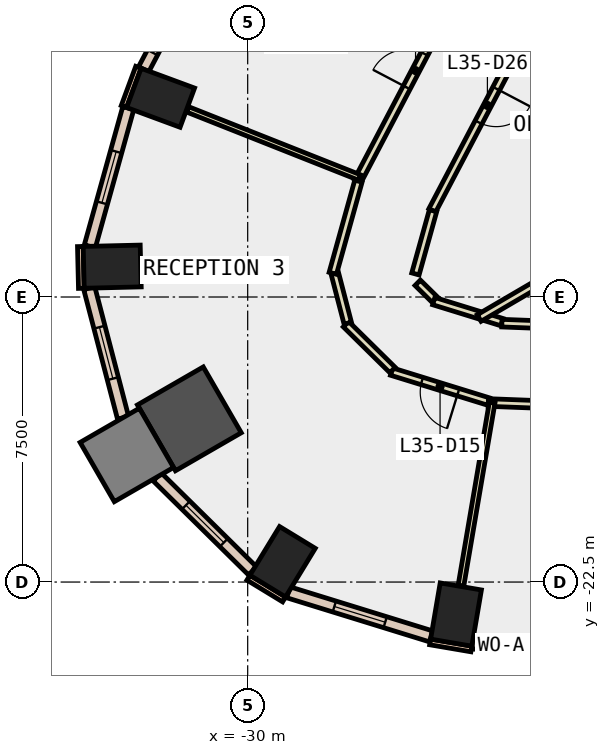
"""IFC4 building model, lengths in metres.
Left out: names, types, materials, properties, quantities, classifications, styles, units other than length and angle.
Written with IfcOpenShell. Run it as: python <this file> out.ifc"""

import sys

from ifc_helpers import new_model, si_unit, direction, frame, frame_2d, origin, origin_2d, place, context, subcontext, project, spatial, rectangle, extrude, element, fill, save


model = new_model("IFC4")
c1 = context("Model", 3, precision=1e-05, world=origin(), true_north=direction((0.0, 1.0)))
c2 = subcontext(c1, "Body", "Model", "MODEL_VIEW")
j1 = project(units=[si_unit("LENGTHUNIT", "METRE"), si_unit("PLANEANGLEUNIT", "RADIAN")], contexts=[c1])
p1 = place(None, origin())
s1 = spatial("IfcSite", under=j1, at=p1, CompositionType="ELEMENT")
p2 = place(p1, origin())
s2 = spatial("IfcBuilding", under=s1, at=p2, CompositionType="ELEMENT")
p3 = place(p2, frame((0.0, 0.0, 159.2)))
s3 = spatial("IfcBuildingStorey", under=s2, at=p3, CompositionType="ELEMENT", Elevation=159.2)
for number, where, z_axis, x_axis in (
    (1, (-24.518, -23.355, -0.4), (0.0, 0.0, 1.0), (-0.986, 0.168, 0.0)),
    (2, (-32.292, -9.758, -0.4), (0.0, 0.0, 1.0), (0.347, 0.938, 0.0)),
    (3, (-33.565, -14.202, -0.4), (0.0, 0.0, 1.0), (-0.024, 1.0, 0.0)),
):
    element("IfcColumn", number, at=place(p3, frame(where, z_axis=z_axis, x_axis=x_axis)), inside=s3, PredefinedType="COLUMN", context=c2, shape_type="SweptSolid", body=[
        extrude(rectangle(XDim=1.1, YDim=1.5, at=origin_2d()), origin(), (0.0, 0.0, 1.0), 4.2),
    ])
p4 = place(p3, frame((-31.535, -18.206, -0.4), z_axis=(0.0, 0.0, 1.0), x_axis=(0.866025403784, 0.5, 0.0)))
e4 = element("IfcColumn", 4, at=p4, inside=s3, PredefinedType="COLUMN", context=c2, shape_type="SweptSolid", body=[
    extrude(rectangle(XDim=2.0, YDim=2.0, at=origin_2d()), origin(), (0.0, 0.0, 1.0), 4.2),
])
p5 = place(p3, frame((-29.082, -21.967, -0.4), z_axis=(0.0, 0.0, 1.0), x_axis=(-0.853714435155, 0.520741455243, 0.0)))
e5 = element("IfcColumn", 5, at=p5, inside=s3, PredefinedType="COLUMN", context=c2, shape_type="SweptSolid", body=[
    extrude(rectangle(XDim=1.1, YDim=1.5, at=origin_2d()), origin(), (0.0, 0.0, 1.0), 4.2),
])
p6 = place(p3, frame((-33.18, -19.156, -0.4), z_axis=(0.0, 0.0, 1.0), x_axis=(0.866025403784, 0.5, 0.0)))
e6 = element("IfcColumn", 6, at=p6, inside=s3, PredefinedType="COLUMN", context=c2, shape_type="SweptSolid", body=[
    extrude(rectangle(XDim=1.8, YDim=1.8, at=origin_2d()), origin(), (0.0, 0.0, 1.0), 4.2),
])
p7 = place(p3, frame((-32.875, -8.956, 0.0), z_axis=(0.0, 0.0, 1.0), x_axis=(-0.346425160624, -0.93807761304, 0.0)))
e7 = element("IfcWall", 7, at=p7, inside=s3, PredefinedType="STANDARD", context=c2, shape_type="SweptSolid", body=[
    extrude(rectangle(XDim=1.1, YDim=0.15, at=frame_2d((0.55, 0.0))), origin(), (0.0, 0.0, 1.0), 3.8),
])
p8 = place(p3, frame((-25.199, -24.076, 0.0), z_axis=(0.0, 0.0, 1.0), x_axis=(0.985763338892, -0.168138751323, 0.0)))
e8 = element("IfcWall", 8, at=p8, inside=s3, PredefinedType="STANDARD", context=c2, shape_type="SweptSolid", body=[
    extrude(rectangle(XDim=1.101, YDim=0.15, at=frame_2d((0.55, 0.0))), origin(), (0.0, 0.0, 1.0), 3.8),
])
p9 = place(p3, frame((-34.403, -13.672, 0.0), z_axis=(0.0, 0.0, 1.0), x_axis=(0.023744690764, -0.999718055084, 0.0)))
e9 = element("IfcWall", 9, at=p9, inside=s3, PredefinedType="STANDARD", context=c2, shape_type="SweptSolid", body=[
    extrude(rectangle(XDim=1.1, YDim=0.15, at=frame_2d((0.55, 0.0))), origin(), (0.0, 0.0, 1.0), 3.8),
])
p10 = place(p3, frame((-29.981, -22.385, 0.0), z_axis=(0.0, 0.0, 1.0), x_axis=(0.854005542721, -0.520263907071, 0.0)))
e10 = element("IfcWall", 10, at=p10, inside=s3, PredefinedType="STANDARD", context=c2, shape_type="SweptSolid", body=[
    extrude(rectangle(XDim=1.099, YDim=0.15, at=frame_2d((0.55, 0.0))), origin(), (0.0, 0.0, 1.0), 3.8),
])
p11 = place(p3, frame((-24.09, -24.114, 0.0), z_axis=(0.0, 0.0, 1.0), x_axis=(0.999262356942, -0.038402369711, 0.0)))
e11 = element("IfcWall", 11, at=p11, inside=s3, PredefinedType="STANDARD", context=c2, shape_type="SweptSolid", body=[
    extrude(rectangle(XDim=7.317, YDim=0.3, at=frame_2d((3.659, 0.0))), origin(), (0.0, 0.0, 1.0), 3.8),
])
p12 = place(p11, frame((0.629, 0.0, 0.9)))
e12 = element("IfcOpeningElement", 12, at=p12, cuts=e11, PredefinedType="OPENING", context=c2, shape_type="SweptSolid", body=[
    extrude(rectangle(XDim=2.4, YDim=2.6, at=frame_2d((1.2, 1.3))), frame((0.0, 0.16, 0.0), z_axis=(0.0, -1.0, 0.0), x_axis=(1.0, 0.0, 0.0)), (0.0, 0.0, 1.0), 0.32),
])
p13 = place(p11, frame((4.288, 0.0, 0.9)))
e13 = element("IfcOpeningElement", 13, at=p13, cuts=e11, PredefinedType="OPENING", context=c2, shape_type="SweptSolid", body=[
    extrude(rectangle(XDim=2.4, YDim=2.6, at=frame_2d((1.2, 1.3))), frame((0.0, 0.16, 0.0), z_axis=(0.0, -1.0, 0.0), x_axis=(1.0, 0.0, 0.0)), (0.0, 0.0, 1.0), 0.32),
])
p14 = place(p3, frame((-29.951, -3.705, 0.0), z_axis=(0.0, 0.0, 1.0), x_axis=(-0.465104650407, -0.885255705528, 0.0)))
e14 = element("IfcWall", 14, at=p14, inside=s3, PredefinedType="STANDARD", context=c2, shape_type="SweptSolid", body=[
    extrude(rectangle(XDim=5.99, YDim=0.3, at=frame_2d((2.995, 0.0))), origin(), (0.0, 0.0, 1.0), 3.8),
])
p15 = place(p14, frame((0.498, 0.0, 0.9)))
e15 = element("IfcOpeningElement", 15, at=p15, cuts=e14, PredefinedType="OPENING", context=c2, shape_type="SweptSolid", body=[
    extrude(rectangle(XDim=2.0, YDim=2.6, at=frame_2d((1.0, 1.3))), frame((0.0, 0.16, 0.0), z_axis=(0.0, -1.0, 0.0), x_axis=(1.0, 0.0, 0.0)), (0.0, 0.0, 1.0), 0.32),
])
p16 = place(p14, frame((3.493, 0.0, 0.9)))
e16 = element("IfcOpeningElement", 16, at=p16, cuts=e14, PredefinedType="OPENING", context=c2, shape_type="SweptSolid", body=[
    extrude(rectangle(XDim=2.0, YDim=2.6, at=frame_2d((1.0, 1.3))), frame((0.0, 0.16, 0.0), z_axis=(0.0, -1.0, 0.0), x_axis=(1.0, 0.0, 0.0)), (0.0, 0.0, 1.0), 0.32),
])
p17 = place(p3, frame((-33.142, -10.029, 0.0), z_axis=(0.0, 0.0, 1.0), x_axis=(-0.26799398221, -0.963420585985, 0.0)))
e17 = element("IfcWall", 17, at=p17, inside=s3, PredefinedType="STANDARD", context=c2, shape_type="SweptSolid", body=[
    extrude(rectangle(XDim=3.776, YDim=0.3, at=frame_2d((1.888, 0.0))), origin(), (0.0, 0.0, 1.0), 3.8),
])
p18 = place(p17, frame((1.188, 0.0, 0.9)))
e18 = element("IfcOpeningElement", 18, at=p18, cuts=e17, PredefinedType="OPENING", context=c2, shape_type="SweptSolid", body=[
    extrude(rectangle(XDim=1.4, YDim=2.6, at=frame_2d((0.7, 1.3))), frame((0.0, 0.16, 0.0), z_axis=(0.0, -1.0, 0.0), x_axis=(1.0, 0.0, 0.0)), (0.0, 0.0, 1.0), 0.32),
])
p19 = place(p3, frame((-34.169, -14.766, 0.0), z_axis=(0.0, 0.0, 1.0), x_axis=(0.252255494168, -0.967660666588, 0.0)))
e19 = element("IfcWall", 19, at=p19, inside=s3, PredefinedType="STANDARD", context=c2, shape_type="SweptSolid", body=[
    extrude(rectangle(XDim=3.524, YDim=0.3, at=frame_2d((1.762, 0.0))), origin(), (0.0, 0.0, 1.0), 3.8),
])
p20 = place(p19, frame((1.062, 0.0, 0.9)))
e20 = element("IfcOpeningElement", 20, at=p20, cuts=e19, PredefinedType="OPENING", context=c2, shape_type="SweptSolid", body=[
    extrude(rectangle(XDim=1.4, YDim=2.6, at=frame_2d((0.7, 1.3))), frame((0.0, 0.16, 0.0), z_axis=(0.0, -1.0, 0.0), x_axis=(1.0, 0.0, 0.0)), (0.0, 0.0, 1.0), 0.32),
])
p21 = place(p3, frame((-32.381, -19.733, 0.0), z_axis=(0.0, 0.0, 1.0), x_axis=(0.712043314899, -0.702135540838, 0.0)))
e21 = element("IfcWall", 21, at=p21, inside=s3, PredefinedType="STANDARD", context=c2, shape_type="SweptSolid", body=[
    extrude(rectangle(XDim=3.524, YDim=0.3, at=frame_2d((1.762, 0.0))), origin(), (0.0, 0.0, 1.0), 3.8),
])
p22 = place(p21, frame((1.062, 0.0, 0.9)))
e22 = element("IfcOpeningElement", 22, at=p22, cuts=e21, PredefinedType="OPENING", context=c2, shape_type="SweptSolid", body=[
    extrude(rectangle(XDim=1.4, YDim=2.6, at=frame_2d((0.7, 1.3))), frame((0.0, 0.16, 0.0), z_axis=(0.0, -1.0, 0.0), x_axis=(1.0, 0.0, 0.0)), (0.0, 0.0, 1.0), 0.32),
])
p23 = place(p3, frame((-28.929, -22.77, 0.0), z_axis=(0.0, 0.0, 1.0), x_axis=(0.955473661147, -0.295076401723, 0.0)))
e23 = element("IfcWall", 23, at=p23, inside=s3, PredefinedType="STANDARD", context=c2, shape_type="SweptSolid", body=[
    extrude(rectangle(XDim=3.931, YDim=0.3, at=frame_2d((1.965, 0.0))), origin(), (0.0, 0.0, 1.0), 3.8),
])
p24 = place(p23, frame((1.266, 0.0, 0.9)))
e24 = element("IfcOpeningElement", 24, at=p24, cuts=e23, PredefinedType="OPENING", context=c2, shape_type="SweptSolid", body=[
    extrude(rectangle(XDim=1.4, YDim=2.6, at=frame_2d((0.7, 1.3))), frame((0.0, 0.16, 0.0), z_axis=(0.0, -1.0, 0.0), x_axis=(1.0, 0.0, 0.0)), (0.0, 0.0, 1.0), 0.32),
])
p25 = place(p3, frame((-22.241, -7.198, 0.0), z_axis=(0.0, 0.0, 1.0), x_axis=(-0.465089990515, -0.885263407536, 0.0)))
e25 = element("IfcWall", 25, at=p25, inside=s3, PredefinedType="PARTITIONING", context=c2, shape_type="SweptSolid", body=[
    extrude(rectangle(XDim=6.24, YDim=0.2, at=frame_2d((3.12, 0.0))), origin(), (0.0, 0.0, 1.0), 3.8),
])
p26 = place(p25, frame((2.62, 0.0, 0.0)))
e26 = element("IfcOpeningElement", 26, at=p26, cuts=e25, PredefinedType="OPENING", context=c2, shape_type="SweptSolid", body=[
    extrude(rectangle(XDim=1.0, YDim=2.1, at=frame_2d((0.5, 1.05))), frame((0.0, 0.11, 0.0), z_axis=(0.0, -1.0, 0.0), x_axis=(1.0, 0.0, 0.0)), (0.0, 0.0, 1.0), 0.22),
])
p27 = place(p3, frame((-25.123, -12.73, 0.0), z_axis=(0.0, 0.0, 1.0), x_axis=(-0.268139825244, -0.963380005044, 0.0)))
e27 = element("IfcWall", 27, at=p27, inside=s3, PredefinedType="PARTITIONING", context=c2, shape_type="SweptSolid", body=[
    extrude(rectangle(XDim=1.726, YDim=0.2, at=frame_2d((0.863, 0.0))), origin(), (0.0, 0.0, 1.0), 3.8),
])
p28 = place(p3, frame((-25.526, -14.626, 0.0), z_axis=(0.0, 0.0, 1.0), x_axis=(0.711758647644, -0.702424108003, 0.0)))
e28 = element("IfcWall", 28, at=p28, inside=s3, PredefinedType="PARTITIONING", context=c2, shape_type="SweptSolid", body=[
    extrude(rectangle(XDim=0.628, YDim=0.2, at=frame_2d((0.314, 0.0))), origin(), (0.0, 0.0, 1.0), 3.8),
])
p29 = place(p3, frame((-25.103, -15.108, 0.0), z_axis=(0.0, 0.0, 1.0), x_axis=(0.955420813731, -0.295247470251, 0.0)))
e29 = element("IfcWall", 29, at=p29, inside=s3, PredefinedType="PARTITIONING", context=c2, shape_type="SweptSolid", body=[
    extrude(rectangle(XDim=1.24, YDim=0.2, at=frame_2d((0.62, 0.0))), origin(), (0.0, 0.0, 1.0), 3.8),
])
p30 = place(p3, frame((-23.727, -15.532, 0.0), z_axis=(0.0, 0.0, 1.0), x_axis=(0.955237350621, -0.295840504289, 0.0)))
e30 = element("IfcWall", 30, at=p30, inside=s3, PredefinedType="PARTITIONING", context=c2, shape_type="SweptSolid", body=[
    extrude(rectangle(XDim=0.44, YDim=0.2, at=frame_2d((0.22, 0.0))), origin(), (0.0, 0.0, 1.0), 3.8),
])
p31 = place(p3, frame((-23.311, -15.688, 0.0), z_axis=(0.0, 0.0, 1.0), x_axis=(0.999262695969, -0.038393546916, 0.0)))
e31 = element("IfcWall", 31, at=p31, inside=s3, PredefinedType="PARTITIONING", context=c2, shape_type="SweptSolid", body=[
    extrude(rectangle(XDim=7.344, YDim=0.2, at=frame_2d((3.672, 0.0))), origin(), (0.0, 0.0, 1.0), 3.8),
])
p32 = place(p31, frame((3.172, 0.0, 0.0)))
e32 = element("IfcOpeningElement", 32, at=p32, cuts=e31, PredefinedType="OPENING", context=c2, shape_type="SweptSolid", body=[
    extrude(rectangle(XDim=1.0, YDim=2.1, at=frame_2d((0.5, 1.05))), frame((0.0, 0.11, 0.0), z_axis=(0.0, -1.0, 0.0), x_axis=(1.0, 0.0, 0.0)), (0.0, 0.0, 1.0), 0.22),
])
p33 = place(p3, frame((-27.106, -11.944, 0.0), z_axis=(0.0, 0.0, 1.0), x_axis=(0.464985599417, 0.885318243534, 0.0)))
e33 = element("IfcWall", 33, at=p33, inside=s3, PredefinedType="PARTITIONING", context=c2, shape_type="SweptSolid", body=[
    extrude(rectangle(XDim=6.402, YDim=0.2, at=frame_2d((3.201, 0.0))), origin(), (0.0, 0.0, 1.0), 3.8),
])
p34 = place(p33, frame((2.776, 0.0, 0.0)))
e34 = element("IfcOpeningElement", 34, at=p34, cuts=e33, PredefinedType="OPENING", context=c2, shape_type="SweptSolid", body=[
    extrude(rectangle(XDim=1.0, YDim=2.1, at=frame_2d((0.5, 1.05))), frame((0.0, 0.11, 0.0), z_axis=(0.0, -1.0, 0.0), x_axis=(1.0, 0.0, 0.0)), (0.0, 0.0, 1.0), 0.22),
])
p35 = place(p3, frame((-23.663, -17.75, 0.0), z_axis=(0.0, 0.0, 1.0), x_axis=(-0.955509582123, 0.294960062501, 0.0)))
e35 = element("IfcWall", 35, at=p35, inside=s3, PredefinedType="PARTITIONING", context=c2, shape_type="SweptSolid", body=[
    extrude(rectangle(XDim=2.668, YDim=0.2, at=frame_2d((1.334, 0.0))), origin(), (0.0, 0.0, 1.0), 3.8),
])
p36 = place(p35, frame((0.834, 0.0, 0.0)))
e36 = element("IfcOpeningElement", 36, at=p36, cuts=e35, PredefinedType="OPENING", context=c2, shape_type="SweptSolid", body=[
    extrude(rectangle(XDim=1.0, YDim=2.1, at=frame_2d((0.5, 1.05))), frame((0.0, 0.11, 0.0), z_axis=(0.0, -1.0, 0.0), x_axis=(1.0, 0.0, 0.0)), (0.0, 0.0, 1.0), 0.22),
])
p37 = place(p3, frame((-26.188, -16.922, 0.0), z_axis=(0.0, 0.0, 1.0), x_axis=(-0.712339678389, 0.701834868465, 0.0)))
e37 = element("IfcWall", 37, at=p37, inside=s3, PredefinedType="PARTITIONING", context=c2, shape_type="SweptSolid", body=[
    extrude(rectangle(XDim=1.72, YDim=0.2, at=frame_2d((0.86, 0.0))), origin(), (0.0, 0.0, 1.0), 3.8),
])
p38 = place(p3, frame((-27.367, -15.688, 0.0), z_axis=(0.0, 0.0, 1.0), x_axis=(-0.25159336549, 0.967833032316, 0.0)))
e38 = element("IfcWall", 38, at=p38, inside=s3, PredefinedType="PARTITIONING", context=c2, shape_type="SweptSolid", body=[
    extrude(rectangle(XDim=1.356, YDim=0.2, at=frame_2d((0.678, 0.0))), origin(), (0.0, 0.0, 1.0), 3.8),
])
p39 = place(p3, frame((-27.76, -14.376, 0.0), z_axis=(0.0, 0.0, 1.0), x_axis=(0.267909096687, 0.963444194498, 0.0)))
e39 = element("IfcWall", 39, at=p39, inside=s3, PredefinedType="PARTITIONING", context=c2, shape_type="SweptSolid", body=[
    extrude(rectangle(XDim=2.516, YDim=0.2, at=frame_2d((1.258, 0.0))), origin(), (0.0, 0.0, 1.0), 3.8),
])
p40 = place(p3, frame((-16.036, -18.069, 0.0), z_axis=(0.0, 0.0, 1.0), x_axis=(-0.999262637786, 0.038395061202, 0.0)))
e40 = element("IfcWall", 40, at=p40, inside=s3, PredefinedType="PARTITIONING", context=c2, shape_type="SweptSolid", body=[
    extrude(rectangle(XDim=7.637, YDim=0.2, at=frame_2d((3.818, 0.0))), origin(), (0.0, 0.0, 1.0), 3.8),
])
p41 = place(p40, frame((3.318, 0.0, 0.0)))
e41 = element("IfcOpeningElement", 41, at=p41, cuts=e40, PredefinedType="OPENING", context=c2, shape_type="SweptSolid", body=[
    extrude(rectangle(XDim=1.0, YDim=2.1, at=frame_2d((0.5, 1.05))), frame((0.0, 0.11, 0.0), z_axis=(0.0, -1.0, 0.0), x_axis=(1.0, 0.0, 0.0)), (0.0, 0.0, 1.0), 0.22),
])
p42 = place(p3, frame((-16.803, -11.397, 0.0), z_axis=(0.0, 0.0, 1.0), x_axis=(-0.863203941699, -0.504855380318, 0.0)))
e42 = element("IfcWall", 42, at=p42, inside=s3, PredefinedType="PARTITIONING", context=c2, shape_type="SweptSolid", body=[
    extrude(rectangle(XDim=8.232, YDim=0.2, at=frame_2d((4.116, 0.0))), origin(), (0.0, 0.0, 1.0), 3.8),
])
p43 = place(p3, frame((-27.059, -11.855, 0.0), z_axis=(0.0, 0.0, 1.0), x_axis=(-0.92964843089, 0.368447818481, 0.0)))
e43 = element("IfcWall", 43, at=p43, inside=s3, PredefinedType="PARTITIONING", context=c2, shape_type="SweptSolid", body=[
    extrude(rectangle(XDim=4.866, YDim=0.15, at=frame_2d((2.433, 0.0))), origin(), (0.0, 0.0, 1.0), 3.8),
])
p44 = place(p3, frame((-23.567, -17.779, 0.0), z_axis=(0.0, 0.0, 1.0), x_axis=(-0.168027663896, -0.985782280306, 0.0)))
e44 = element("IfcWall", 44, at=p44, inside=s3, PredefinedType="PARTITIONING", context=c2, shape_type="SweptSolid", body=[
    extrude(rectangle(XDim=4.886, YDim=0.15, at=frame_2d((2.443, 0.0))), origin(), (0.0, 0.0, 1.0), 3.8),
])
p45 = place(p12, origin())
e45 = element("IfcWindow", 45, at=p45, inside=s3, PartitioningType="SINGLE_PANEL", PredefinedType="WINDOW", context=c2, shape_type="SweptSolid", body=[
    extrude(rectangle(XDim=2.4, YDim=2.6, at=frame_2d((1.2, 1.3))), frame((0.0, 0.03, 0.0), z_axis=(0.0, -1.0, 0.0), x_axis=(1.0, 0.0, 0.0)), (0.0, 0.0, 1.0), 0.06),
])
fill(e12, e45)
p46 = place(p16, origin())
e46 = element("IfcWindow", 46, at=p46, inside=s3, PartitioningType="SINGLE_PANEL", PredefinedType="WINDOW", context=c2, shape_type="SweptSolid", body=[
    extrude(rectangle(XDim=2.0, YDim=2.6, at=frame_2d((1.0, 1.3))), frame((0.0, 0.03, 0.0), z_axis=(0.0, -1.0, 0.0), x_axis=(1.0, 0.0, 0.0)), (0.0, 0.0, 1.0), 0.06),
])
fill(e16, e46)
p47 = place(p18, origin())
e47 = element("IfcWindow", 47, at=p47, inside=s3, PartitioningType="SINGLE_PANEL", PredefinedType="WINDOW", context=c2, shape_type="SweptSolid", body=[
    extrude(rectangle(XDim=1.4, YDim=2.6, at=frame_2d((0.7, 1.3))), frame((0.0, 0.03, 0.0), z_axis=(0.0, -1.0, 0.0), x_axis=(1.0, 0.0, 0.0)), (0.0, 0.0, 1.0), 0.06),
])
fill(e18, e47)
p48 = place(p20, origin())
e48 = element("IfcWindow", 48, at=p48, inside=s3, PartitioningType="SINGLE_PANEL", PredefinedType="WINDOW", context=c2, shape_type="SweptSolid", body=[
    extrude(rectangle(XDim=1.4, YDim=2.6, at=frame_2d((0.7, 1.3))), frame((0.0, 0.03, 0.0), z_axis=(0.0, -1.0, 0.0), x_axis=(1.0, 0.0, 0.0)), (0.0, 0.0, 1.0), 0.06),
])
fill(e20, e48)
p49 = place(p22, origin())
e49 = element("IfcWindow", 49, at=p49, inside=s3, PartitioningType="SINGLE_PANEL", PredefinedType="WINDOW", context=c2, shape_type="SweptSolid", body=[
    extrude(rectangle(XDim=1.4, YDim=2.6, at=frame_2d((0.7, 1.3))), frame((0.0, 0.03, 0.0), z_axis=(0.0, -1.0, 0.0), x_axis=(1.0, 0.0, 0.0)), (0.0, 0.0, 1.0), 0.06),
])
fill(e22, e49)
p50 = place(p24, origin())
e50 = element("IfcWindow", 50, at=p50, inside=s3, PartitioningType="SINGLE_PANEL", PredefinedType="WINDOW", context=c2, shape_type="SweptSolid", body=[
    extrude(rectangle(XDim=1.4, YDim=2.6, at=frame_2d((0.7, 1.3))), frame((0.0, 0.03, 0.0), z_axis=(0.0, -1.0, 0.0), x_axis=(1.0, 0.0, 0.0)), (0.0, 0.0, 1.0), 0.06),
])
fill(e24, e50)
p51 = place(p34, origin())
e51 = element("IfcDoor", 51, at=p51, inside=s3, OperationType="SINGLE_SWING_LEFT", PredefinedType="DOOR", context=c2, shape_type="SweptSolid", body=[
    extrude(rectangle(XDim=1.0, YDim=2.1, at=frame_2d((0.5, 1.05))), frame((0.0, 0.025, 0.0), z_axis=(0.0, -1.0, 0.0), x_axis=(1.0, 0.0, 0.0)), (0.0, 0.0, 1.0), 0.05),
])
fill(e34, e51)
p52 = place(p36, origin())
e52 = element("IfcDoor", 52, at=p52, inside=s3, OperationType="SINGLE_SWING_LEFT", PredefinedType="DOOR", context=c2, shape_type="SweptSolid", body=[
    extrude(rectangle(XDim=1.0, YDim=2.1, at=frame_2d((0.5, 1.05))), frame((0.0, 0.025, 0.0), z_axis=(0.0, -1.0, 0.0), x_axis=(1.0, 0.0, 0.0)), (0.0, 0.0, 1.0), 0.05),
])
fill(e36, e52)
p53 = place(p26, origin())
e53 = element("IfcDoor", 53, at=p53, inside=s3, OperationType="SINGLE_SWING_LEFT", PredefinedType="DOOR", context=c2, shape_type="SweptSolid", body=[
    extrude(rectangle(XDim=1.0, YDim=2.1, at=frame_2d((0.5, 1.05))), frame((0.0, 0.025, 0.0), z_axis=(0.0, -1.0, 0.0), x_axis=(1.0, 0.0, 0.0)), (0.0, 0.0, 1.0), 0.05),
])
fill(e26, e53)
save(model, sys.argv[1])
